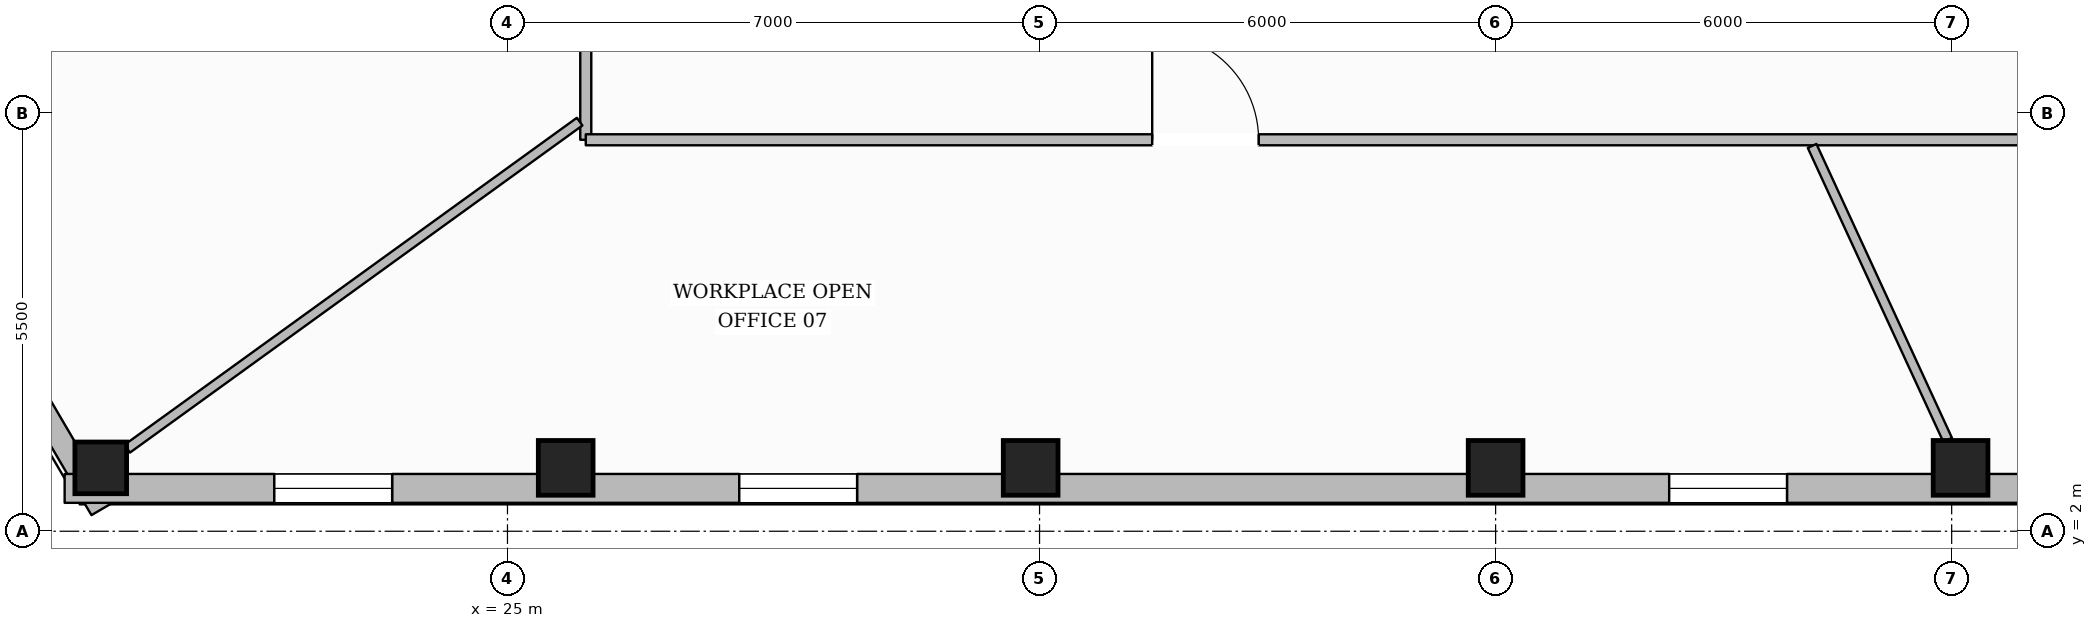
"""IFC4 building model, lengths in metres.
Left out: names, types, materials, properties, quantities, classifications, styles, units other than length and angle.
Written with IfcOpenShell. Run it as: python <this file> out.ifc"""

import sys

from ifc_helpers import new_model, si_unit, direction, frame, frame_2d, origin, origin_2d, place, context, subcontext, project, spatial, rectangle, hollow_rectangle, extrude, element, fill, save


model = new_model("IFC4")
c1 = context("Model", 3, precision=1e-05, world=origin(), true_north=direction((0.0, 1.0)))
c2 = subcontext(c1, "Body", "Model", "MODEL_VIEW")
j1 = project(units=[si_unit("LENGTHUNIT", "METRE"), si_unit("PLANEANGLEUNIT", "RADIAN")], contexts=[c1])
p1 = place(None, origin())
s1 = spatial("IfcSite", under=j1, at=p1, CompositionType="ELEMENT")
p2 = place(p1, origin())
s2 = spatial("IfcBuilding", under=s1, at=p2, CompositionType="ELEMENT")
p3 = place(p2, frame((0.0, 0.0, 131.7)))
s3 = spatial("IfcBuildingStorey", under=s2, at=p3, CompositionType="ELEMENT", Elevation=131.7)
p4 = place(p3, frame((19.649, 2.834, 0.0), z_axis=(0.0, 0.0, 1.0), x_axis=(1.0, 0.0, 0.0)))
e1 = element("IfcColumn", 1, at=p4, inside=s3, PredefinedType="COLUMN", context=c2, shape_type="SweptSolid", body=[
    extrude(hollow_rectangle(XDim=0.68, YDim=0.68, WallThickness=0.03, at=origin_2d()), origin(), (0.0, 0.0, 1.0), 3.6),
])
for number, where, z_axis, x_axis in (
    (2, (25.766, 2.834, 0.0), (0.0, 0.0, 1.0), (1.0, 0.0, 0.0)),
    (3, (31.883, 2.834, 0.0), (0.0, 0.0, 1.0), (1.0, 0.0, 0.0)),
    (4, (38.0, 2.834, 0.0), (0.0, 0.0, 1.0), (1.0, 0.0, 0.0)),
    (5, (44.117, 2.834, 0.0), (0.0, 0.0, 1.0), (1.0, 0.0, 0.0)),
):
    element("IfcColumn", number, at=place(p3, frame(where, z_axis=z_axis, x_axis=x_axis)), inside=s3, PredefinedType="COLUMN", context=c2, shape_type="SweptSolid", body=[
        extrude(hollow_rectangle(XDim=0.72, YDim=0.72, WallThickness=0.032, at=origin_2d()), origin(), (0.0, 0.0, 1.0), 3.6),
    ])
p5 = place(p3, frame((19.656, 2.288, 0.0), z_axis=(0.0, 0.0, 1.0), x_axis=(-0.505835558362, 0.862629925227, 0.0)))
e6 = element("IfcWall", 6, at=p5, inside=s3, PredefinedType="STANDARD", context=c2, shape_type="SweptSolid", body=[
    extrude(rectangle(XDim=12.2, YDim=0.3, at=frame_2d((6.1, 0.0))), origin(), (0.0, 0.0, 1.0), 3.059),
])
p6 = place(p5, frame((5.5, 0.0, 0.65)))
e7 = element("IfcOpeningElement", 7, at=p6, cuts=e6, PredefinedType="OPENING", context=c2, shape_type="SweptSolid", body=[
    extrude(rectangle(XDim=1.2, YDim=1.7, at=frame_2d((0.6, 0.85))), frame((0.0, 0.16, 0.0), z_axis=(0.0, -1.0, 0.0), x_axis=(1.0, 0.0, 0.0)), (0.0, 0.0, 1.0), 0.32),
])
p7 = place(p3, frame((56.826, 2.564, 0.0), z_axis=(0.0, 0.0, 1.0), x_axis=(-1.0, 0.0, 0.0)))
e8 = element("IfcWall", 8, at=p7, inside=s3, PredefinedType="STANDARD", context=c2, shape_type="SweptSolid", body=[
    extrude(rectangle(XDim=37.652, YDim=0.38, at=frame_2d((18.826, 0.0))), origin(), (0.0, 0.0, 1.0), 3.059),
])
p8 = place(p7, frame((33.344, 0.0, 0.65)))
e9 = element("IfcOpeningElement", 9, at=p8, cuts=e8, PredefinedType="OPENING", context=c2, shape_type="SweptSolid", body=[
    extrude(rectangle(XDim=1.55, YDim=1.75, at=frame_2d((0.775, 0.875))), frame((0.0, 0.2, 0.0), z_axis=(0.0, -1.0, 0.0), x_axis=(1.0, 0.0, 0.0)), (0.0, 0.0, 1.0), 0.4),
])
p9 = place(p7, frame((27.227, 0.0, 0.65)))
e10 = element("IfcOpeningElement", 10, at=p9, cuts=e8, PredefinedType="OPENING", context=c2, shape_type="SweptSolid", body=[
    extrude(rectangle(XDim=1.55, YDim=1.75, at=frame_2d((0.775, 0.875))), frame((0.0, 0.2, 0.0), z_axis=(0.0, -1.0, 0.0), x_axis=(1.0, 0.0, 0.0)), (0.0, 0.0, 1.0), 0.4),
])
p10 = place(p7, frame((14.993, 0.0, 0.65)))
e11 = element("IfcOpeningElement", 11, at=p10, cuts=e8, PredefinedType="OPENING", context=c2, shape_type="SweptSolid", body=[
    extrude(rectangle(XDim=1.55, YDim=1.75, at=frame_2d((0.775, 0.875))), frame((0.0, 0.2, 0.0), z_axis=(0.0, -1.0, 0.0), x_axis=(1.0, 0.0, 0.0)), (0.0, 0.0, 1.0), 0.4),
])
p11 = place(p7, frame((8.875, 0.0, 0.65)))
e12 = element("IfcOpeningElement", 12, at=p11, cuts=e8, PredefinedType="OPENING", context=c2, shape_type="SweptSolid", body=[
    extrude(rectangle(XDim=1.55, YDim=1.75, at=frame_2d((0.775, 0.875))), frame((0.0, 0.2, 0.0), z_axis=(0.0, -1.0, 0.0), x_axis=(1.0, 0.0, 0.0)), (0.0, 0.0, 1.0), 0.4),
])
p12 = place(p7, frame((2.759, 0.0, 0.65)))
e13 = element("IfcOpeningElement", 13, at=p12, cuts=e8, PredefinedType="OPENING", context=c2, shape_type="SweptSolid", body=[
    extrude(rectangle(XDim=1.55, YDim=1.75, at=frame_2d((0.775, 0.875))), frame((0.0, 0.2, 0.0), z_axis=(0.0, -1.0, 0.0), x_axis=(1.0, 0.0, 0.0)), (0.0, 0.0, 1.0), 0.4),
])
p13 = place(p3, frame((26.03, 25.05, 0.0), z_axis=(0.0, 0.0, 1.0), x_axis=(0.0, -1.0, 0.0)))
e14 = element("IfcWall", 14, at=p13, inside=s3, PredefinedType="PARTITIONING", context=c2, shape_type="SweptSolid", body=[
    extrude(rectangle(XDim=17.9, YDim=0.145, at=frame_2d((8.95, 0.0))), origin(), (0.0, 0.0, 1.0), 3.288),
])
p14 = place(p13, frame((3.597, 0.0, 0.0)))
e15 = element("IfcOpeningElement", 15, at=p14, cuts=e14, PredefinedType="OPENING", context=c2, shape_type="SweptSolid", body=[
    extrude(rectangle(XDim=0.98, YDim=2.15, at=frame_2d((0.49, 1.075))), frame((0.0, 0.083, 0.0), z_axis=(0.0, -1.0, 0.0), x_axis=(1.0, 0.0, 0.0)), (0.0, 0.0, 1.0), 0.165),
])
p15 = place(p13, frame((12.103, 0.0, 0.0)))
e16 = element("IfcOpeningElement", 16, at=p15, cuts=e14, PredefinedType="OPENING", context=c2, shape_type="SweptSolid", body=[
    extrude(rectangle(XDim=1.4, YDim=2.2, at=frame_2d((0.7, 1.1))), frame((0.0, 0.083, 0.0), z_axis=(0.0, -1.0, 0.0), x_axis=(1.0, 0.0, 0.0)), (0.0, 0.0, 1.0), 0.165),
])
p16 = place(p3, frame((26.03, 7.15, 0.0), z_axis=(0.0, 0.0, 1.0), x_axis=(1.0, 0.0, 0.0)))
e17 = element("IfcWall", 17, at=p16, inside=s3, PredefinedType="PARTITIONING", context=c2, shape_type="SweptSolid", body=[
    extrude(rectangle(XDim=23.94, YDim=0.145, at=frame_2d((11.97, 0.0))), origin(), (0.0, 0.0, 1.0), 3.6),
])
p17 = place(p16, frame((7.452, 0.0, 0.0)))
e18 = element("IfcOpeningElement", 18, at=p17, cuts=e17, PredefinedType="OPENING", context=c2, shape_type="SweptSolid", body=[
    extrude(rectangle(XDim=1.4, YDim=2.2, at=frame_2d((0.7, 1.1))), frame((0.0, 0.083, 0.0), z_axis=(0.0, -1.0, 0.0), x_axis=(1.0, 0.0, 0.0)), (0.0, 0.0, 1.0), 0.165),
])
p18 = place(p16, frame((19.642, 0.0, 0.0)))
e19 = element("IfcOpeningElement", 19, at=p18, cuts=e17, PredefinedType="OPENING", context=c2, shape_type="SweptSolid", body=[
    extrude(rectangle(XDim=1.02, YDim=2.15, at=frame_2d((0.51, 1.075))), frame((0.0, 0.083, 0.0), z_axis=(0.0, -1.0, 0.0), x_axis=(1.0, 0.0, 0.0)), (0.0, 0.0, 1.0), 0.165),
])
p19 = place(p3, frame((25.949, 7.389, 0.0), z_axis=(0.0, 0.0, 1.0), x_axis=(-0.810414453305, -0.585856990975, 0.0)))
e20 = element("IfcWall", 20, at=p19, inside=s3, PredefinedType="PARTITIONING", context=c2, shape_type="SweptSolid", body=[
    extrude(rectangle(XDim=7.345, YDim=0.125, at=frame_2d((3.673, 0.0))), origin(), (0.0, 0.0, 1.0), 3.141),
])
p20 = place(p3, frame((42.164, 7.07, 0.0), z_axis=(0.0, 0.0, 1.0), x_axis=(0.418741898832, -0.908105292443, 0.0)))
e21 = element("IfcWall", 21, at=p20, inside=s3, PredefinedType="PARTITIONING", context=c2, shape_type="SweptSolid", body=[
    extrude(rectangle(XDim=4.259, YDim=0.125, at=frame_2d((2.129, 0.0))), origin(), (0.0, 0.0, 1.0), 3.6),
])
p21 = place(p8, origin())
e22 = element("IfcWindow", 22, at=p21, inside=s3, PartitioningType="SINGLE_PANEL", PredefinedType="WINDOW", context=c2, shape_type="SweptSolid", body=[
    extrude(rectangle(XDim=1.55, YDim=1.75, at=frame_2d((0.775, 0.875))), frame((0.0, 0.03, 0.0), z_axis=(0.0, -1.0, 0.0), x_axis=(1.0, 0.0, 0.0)), (0.0, 0.0, 1.0), 0.06),
])
fill(e9, e22)
p22 = place(p9, origin())
e23 = element("IfcWindow", 23, at=p22, inside=s3, PartitioningType="SINGLE_PANEL", PredefinedType="WINDOW", context=c2, shape_type="SweptSolid", body=[
    extrude(rectangle(XDim=1.55, YDim=1.75, at=frame_2d((0.775, 0.875))), frame((0.0, 0.03, 0.0), z_axis=(0.0, -1.0, 0.0), x_axis=(1.0, 0.0, 0.0)), (0.0, 0.0, 1.0), 0.06),
])
fill(e10, e23)
p23 = place(p10, origin())
e24 = element("IfcWindow", 24, at=p23, inside=s3, PartitioningType="SINGLE_PANEL", PredefinedType="WINDOW", context=c2, shape_type="SweptSolid", body=[
    extrude(rectangle(XDim=1.55, YDim=1.75, at=frame_2d((0.775, 0.875))), frame((0.0, 0.03, 0.0), z_axis=(0.0, -1.0, 0.0), x_axis=(1.0, 0.0, 0.0)), (0.0, 0.0, 1.0), 0.06),
])
fill(e11, e24)
p24 = place(p17, origin())
e25 = element("IfcDoor", 25, at=p24, inside=s3, OperationType="SINGLE_SWING_LEFT", PredefinedType="DOOR", context=c2, shape_type="SweptSolid", body=[
    extrude(rectangle(XDim=1.4, YDim=2.2, at=frame_2d((0.7, 1.1))), frame((0.0, 0.025, 0.0), z_axis=(0.0, -1.0, 0.0), x_axis=(1.0, 0.0, 0.0)), (0.0, 0.0, 1.0), 0.05),
])
fill(e18, e25)
save(model, sys.argv[1])
